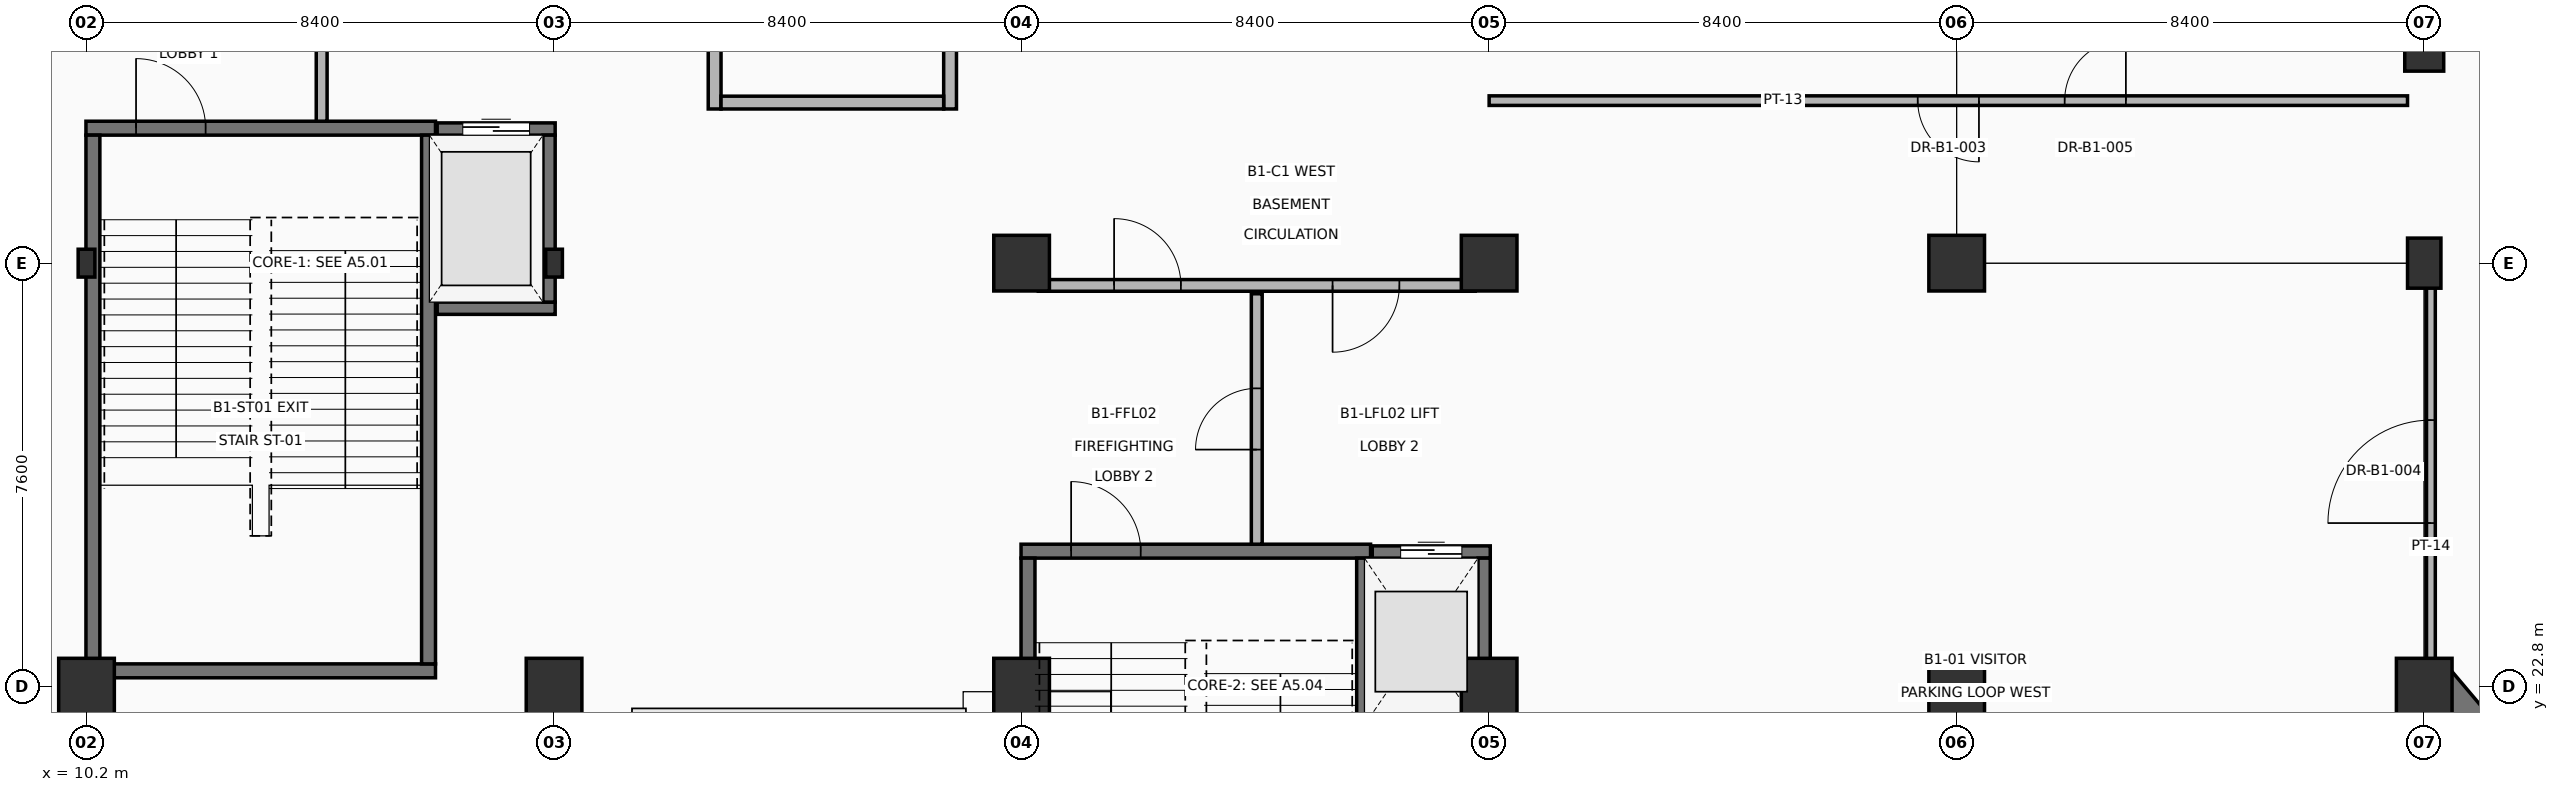
"""IFC4 building model, lengths in metres.
Left out: names, types, materials, properties, quantities, classifications, styles, units other than length and angle.
Written with IfcOpenShell. Run it as: python <this file> out.ifc"""

import sys

from ifc_helpers import new_model, si_unit, direction, frame, frame_2d, origin, origin_2d, place, context, subcontext, project, spatial, rectangle, hollow_rectangle, extrude, element, fill, save


model = new_model("IFC4")
c1 = context("Model", 3, precision=1e-05, world=origin(), true_north=direction((0.0, 1.0)))
c2 = subcontext(c1, "Body", "Model", "MODEL_VIEW")
j1 = project(units=[si_unit("LENGTHUNIT", "METRE"), si_unit("PLANEANGLEUNIT", "RADIAN")], contexts=[c1])
p1 = place(None, origin())
s1 = spatial("IfcSite", under=j1, at=p1, CompositionType="ELEMENT")
p2 = place(p1, origin())
s2 = spatial("IfcBuilding", under=s1, at=p2, CompositionType="ELEMENT")
p3 = place(p2, frame((0.0, 0.0, -5.4)))
s3 = spatial("IfcBuildingStorey", under=s2, at=p3, CompositionType="ELEMENT", Elevation=-5.4)
p4 = place(p3, frame((10.2, 22.8, 0.0), z_axis=(0.0, 0.0, 1.0), x_axis=(1.0, 0.0, 0.0)))
e1 = element("IfcColumn", 1, at=p4, inside=s3, PredefinedType="COLUMN", context=c2, shape_type="SweptSolid", body=[
    extrude(rectangle(XDim=1.0, YDim=1.0, at=origin_2d()), origin(), (0.0, 0.0, 1.0), 5.4),
])
p5 = place(p3, frame((10.2, 30.4, 0.0), z_axis=(0.0, 0.0, 1.0), x_axis=(1.0, 0.0, 0.0)))
e2 = element("IfcColumn", 2, at=p5, inside=s3, PredefinedType="COLUMN", context=c2, shape_type="SweptSolid", body=[
    extrude(hollow_rectangle(XDim=0.3, YDim=0.5, WallThickness=0.016, at=origin_2d()), origin(), (0.0, 0.0, 1.0), 5.4),
])
p6 = place(p3, frame((18.6, 22.8, 0.0), z_axis=(0.0, 0.0, 1.0), x_axis=(1.0, 0.0, 0.0)))
e3 = element("IfcColumn", 3, at=p6, inside=s3, PredefinedType="COLUMN", context=c2, shape_type="SweptSolid", body=[
    extrude(rectangle(XDim=1.0, YDim=1.0, at=origin_2d()), origin(), (0.0, 0.0, 1.0), 5.4),
])
p7 = place(p3, frame((18.6, 30.4, 0.0), z_axis=(0.0, 0.0, 1.0), x_axis=(1.0, 0.0, 0.0)))
e4 = element("IfcColumn", 4, at=p7, inside=s3, PredefinedType="COLUMN", context=c2, shape_type="SweptSolid", body=[
    extrude(hollow_rectangle(XDim=0.3, YDim=0.5, WallThickness=0.016, at=origin_2d()), origin(), (0.0, 0.0, 1.0), 5.4),
])
for number, where, z_axis, x_axis in (
    (5, (27.0, 22.8, 0.0), (0.0, 0.0, 1.0), (1.0, 0.0, 0.0)),
    (6, (27.0, 30.4, 0.0), (0.0, 0.0, 1.0), (1.0, 0.0, 0.0)),
    (7, (35.4, 22.8, 0.0), (0.0, 0.0, 1.0), (1.0, 0.0, 0.0)),
    (8, (35.4, 30.4, 0.0), (0.0, 0.0, 1.0), (1.0, 0.0, 0.0)),
):
    element("IfcColumn", number, at=place(p3, frame(where, z_axis=z_axis, x_axis=x_axis)), inside=s3, PredefinedType="COLUMN", context=c2, shape_type="SweptSolid", body=[
        extrude(rectangle(XDim=1.0, YDim=1.0, at=origin_2d()), origin(), (0.0, 0.0, 1.0), 5.4),
    ])
p8 = place(p3, frame((43.8, 22.8, 0.0), z_axis=(0.0, 0.0, 1.0), x_axis=(1.0, 0.0, 0.0)))
e9 = element("IfcColumn", 9, at=p8, inside=s3, PredefinedType="COLUMN", context=c2, shape_type="SweptSolid", body=[
    extrude(rectangle(XDim=1.0, YDim=1.0, at=origin_2d()), origin(), (0.0, 0.0, 1.0), 5.12),
])
for number, where, z_axis, x_axis in (
    (10, (43.8, 30.4, 0.0), (0.0, 0.0, 1.0), (1.0, 0.0, 0.0)),
    (11, (52.2, 22.8, 0.0), (0.0, 0.0, 1.0), (1.0, 0.0, 0.0)),
):
    element("IfcColumn", number, at=place(p3, frame(where, z_axis=z_axis, x_axis=x_axis)), inside=s3, PredefinedType="COLUMN", context=c2, shape_type="SweptSolid", body=[
        extrude(rectangle(XDim=1.0, YDim=1.0, at=origin_2d()), origin(), (0.0, 0.0, 1.0), 5.4),
    ])
p9 = place(p3, frame((52.2, 30.4, 0.0), z_axis=(0.0, 0.0, 1.0), x_axis=(1.0, 0.0, 0.0)))
e12 = element("IfcColumn", 12, at=p9, inside=s3, PredefinedType="COLUMN", context=c2, shape_type="SweptSolid", body=[
    extrude(rectangle(XDim=0.6, YDim=0.9, at=origin_2d()), origin(), (0.0, 0.0, 1.0), 5.4),
])
p10 = place(p3, frame((52.2, 34.2, 0.0), z_axis=(0.0, 0.0, 1.0), x_axis=(1.0, 0.0, 0.0)))
e13 = element("IfcColumn", 13, at=p10, inside=s3, PredefinedType="COLUMN", context=c2, shape_type="SweptSolid", body=[
    extrude(rectangle(XDim=0.7, YDim=0.7, at=origin_2d()), origin(), (0.0, 0.0, 1.0), 5.4),
])
p11 = place(p3, frame((57.06, 17.478, 0.0), z_axis=(0.0, 0.0, 1.0), x_axis=(-0.645642843129, 0.76363952171, 0.0)))
e14 = element("IfcWall", 14, at=p11, inside=s3, PredefinedType="USERDEFINED", context=c2, shape_type="SweptSolid", body=[
    extrude(rectangle(XDim=7.202, YDim=0.55, at=frame_2d((3.601, 0.0))), origin(), (0.0, 0.0, 1.0), 5.16),
])
p12 = place(p3, frame((10.19, 23.075, 0.0), z_axis=(0.0, 0.0, 1.0), x_axis=(1.0, 0.0, 0.0)))
e15 = element("IfcWall", 15, at=p12, inside=s3, PredefinedType="SHEAR", context=c2, shape_type="SweptSolid", body=[
    extrude(rectangle(XDim=6.28, YDim=0.25, at=frame_2d((3.14, 0.0))), origin(), (0.0, 0.0, 1.0), 5.12),
])
p13 = place(p3, frame((10.19, 32.825, 0.0), z_axis=(0.0, 0.0, 1.0), x_axis=(1.0, 0.0, 0.0)))
e16 = element("IfcWall", 16, at=p13, inside=s3, PredefinedType="SHEAR", context=c2, shape_type="SweptSolid", body=[
    extrude(rectangle(XDim=6.28, YDim=0.25, at=frame_2d((3.14, 0.0))), origin(), (0.0, 0.0, 1.0), 5.12),
])
p14 = place(p13, frame((0.9, 0.0, 0.0)))
e17 = element("IfcOpeningElement", 17, at=p14, cuts=e16, PredefinedType="OPENING", context=c2, shape_type="SweptSolid", body=[
    extrude(rectangle(XDim=1.25, YDim=2.2, at=frame_2d((0.625, 1.1))), frame((0.0, 0.135, 0.0), z_axis=(0.0, -1.0, 0.0), x_axis=(1.0, 0.0, 0.0)), (0.0, 0.0, 1.0), 0.27),
])
for number, where, z_axis, x_axis in (
    (18, (10.315, 23.2, 0.0), (0.0, 0.0, 1.0), (0.0, 1.0, 0.0)),
    (19, (16.345, 23.2, 0.0), (0.0, 0.0, 1.0), (0.0, 1.0, 0.0)),
):
    element("IfcWall", number, at=place(p3, frame(where, z_axis=z_axis, x_axis=x_axis)), inside=s3, PredefinedType="SHEAR", context=c2, shape_type="SweptSolid", body=[
        extrude(rectangle(XDim=9.5, YDim=0.25, at=frame_2d((4.75, 0.0))), origin(), (0.0, 0.0, 1.0), 5.12),
    ])
p15 = place(p3, frame((16.5, 29.59, 0.0), z_axis=(0.0, 0.0, 1.0), x_axis=(1.0, 0.0, 0.0)))
e20 = element("IfcWall", 20, at=p15, inside=s3, PredefinedType="SHEAR", context=c2, shape_type="SweptSolid", body=[
    extrude(rectangle(XDim=2.12, YDim=0.22, at=frame_2d((1.06, 0.0))), origin(), (0.0, 0.0, 1.0), 5.12),
])
p16 = place(p3, frame((16.5, 32.81, 0.0), z_axis=(0.0, 0.0, 1.0), x_axis=(1.0, 0.0, 0.0)))
e21 = element("IfcWall", 21, at=p16, inside=s3, PredefinedType="SHEAR", context=c2, shape_type="SweptSolid", body=[
    extrude(rectangle(XDim=2.12, YDim=0.22, at=frame_2d((1.06, 0.0))), origin(), (0.0, 0.0, 1.0), 5.12),
])
p17 = place(p16, frame((0.46, 0.0, 0.0)))
e22 = element("IfcOpeningElement", 22, at=p17, cuts=e21, PredefinedType="OPENING", context=c2, shape_type="SweptSolid", body=[
    extrude(rectangle(XDim=1.2, YDim=2.2, at=frame_2d((0.6, 1.1))), frame((0.0, 0.12, 0.0), z_axis=(0.0, -1.0, 0.0), x_axis=(1.0, 0.0, 0.0)), (0.0, 0.0, 1.0), 0.24),
])
p18 = place(p3, frame((18.51, 29.7, 0.0), z_axis=(0.0, 0.0, 1.0), x_axis=(0.0, 1.0, 0.0)))
e23 = element("IfcWall", 23, at=p18, inside=s3, PredefinedType="SHEAR", context=c2, shape_type="SweptSolid", body=[
    extrude(rectangle(XDim=3.0, YDim=0.22, at=frame_2d((1.5, 0.0))), origin(), (0.0, 0.0, 1.0), 5.12),
])
p19 = place(p3, frame((14.425, 32.95, 0.0), z_axis=(0.0, 0.0, 1.0), x_axis=(0.0, 1.0, 0.0)))
e24 = element("IfcWall", 24, at=p19, inside=s3, PredefinedType="PARTITIONING", context=c2, shape_type="SweptSolid", body=[
    extrude(rectangle(XDim=4.5, YDim=0.195, at=frame_2d((2.25, 0.0))), origin(), (0.0, 0.0, 1.0), 5.12),
])
p20 = place(p19, frame((1.7, 0.0, 0.0)))
e25 = element("IfcOpeningElement", 25, at=p20, cuts=e24, PredefinedType="OPENING", context=c2, shape_type="SweptSolid", body=[
    extrude(rectangle(XDim=1.1, YDim=2.15, at=frame_2d((0.55, 1.075))), frame((0.0, 0.107, 0.0), z_axis=(0.0, -1.0, 0.0), x_axis=(1.0, 0.0, 0.0)), (0.0, 0.0, 1.0), 0.215),
])
p21 = place(p3, frame((26.99, 25.225, 0.0), z_axis=(0.0, 0.0, 1.0), x_axis=(1.0, 0.0, 0.0)))
e26 = element("IfcWall", 26, at=p21, inside=s3, PredefinedType="SHEAR", context=c2, shape_type="SweptSolid", body=[
    extrude(rectangle(XDim=6.28, YDim=0.25, at=frame_2d((3.14, 0.0))), origin(), (0.0, 0.0, 1.0), 5.12),
])
p22 = place(p21, frame((0.9, 0.0, 0.0)))
e27 = element("IfcOpeningElement", 27, at=p22, cuts=e26, PredefinedType="OPENING", context=c2, shape_type="SweptSolid", body=[
    extrude(rectangle(XDim=1.25, YDim=2.2, at=frame_2d((0.625, 1.1))), frame((0.0, 0.135, 0.0), z_axis=(0.0, -1.0, 0.0), x_axis=(1.0, 0.0, 0.0)), (0.0, 0.0, 1.0), 0.27),
])
for number, where, z_axis, x_axis in (
    (28, (27.115, 15.6, 0.0), (0.0, 0.0, 1.0), (0.0, 1.0, 0.0)),
    (29, (33.145, 15.6, 0.0), (0.0, 0.0, 1.0), (0.0, 1.0, 0.0)),
):
    element("IfcWall", number, at=place(p3, frame(where, z_axis=z_axis, x_axis=x_axis)), inside=s3, PredefinedType="SHEAR", context=c2, shape_type="SweptSolid", body=[
        extrude(rectangle(XDim=9.5, YDim=0.25, at=frame_2d((4.75, 0.0))), origin(), (0.0, 0.0, 1.0), 5.12),
    ])
p23 = place(p3, frame((33.3, 25.21, 0.0), z_axis=(0.0, 0.0, 1.0), x_axis=(1.0, 0.0, 0.0)))
e30 = element("IfcWall", 30, at=p23, inside=s3, PredefinedType="SHEAR", context=c2, shape_type="SweptSolid", body=[
    extrude(rectangle(XDim=2.12, YDim=0.22, at=frame_2d((1.06, 0.0))), origin(), (0.0, 0.0, 1.0), 5.12),
])
p24 = place(p23, frame((0.51, 0.0, 0.0)))
e31 = element("IfcOpeningElement", 31, at=p24, cuts=e30, PredefinedType="OPENING", context=c2, shape_type="SweptSolid", body=[
    extrude(rectangle(XDim=1.1, YDim=2.15, at=frame_2d((0.55, 1.075))), frame((0.0, 0.12, 0.0), z_axis=(0.0, -1.0, 0.0), x_axis=(1.0, 0.0, 0.0)), (0.0, 0.0, 1.0), 0.24),
])
p25 = place(p3, frame((35.31, 22.1, 0.0), z_axis=(0.0, 0.0, 1.0), x_axis=(0.0, 1.0, 0.0)))
e32 = element("IfcWall", 32, at=p25, inside=s3, PredefinedType="SHEAR", context=c2, shape_type="SweptSolid", body=[
    extrude(rectangle(XDim=3.0, YDim=0.22, at=frame_2d((1.5, 0.0))), origin(), (0.0, 0.0, 1.0), 5.12),
])
p26 = place(p3, frame((27.3, 30.0, 0.0), z_axis=(0.0, 0.0, 1.0), x_axis=(1.0, 0.0, 0.0)))
e33 = element("IfcWall", 33, at=p26, inside=s3, PredefinedType="PARTITIONING", context=c2, shape_type="SweptSolid", body=[
    extrude(rectangle(XDim=7.85, YDim=0.21, at=frame_2d((3.925, 0.0))), origin(), (0.0, 0.0, 1.0), 5.12),
])
p27 = place(p26, frame((1.362, 0.0, 0.0)))
e34 = element("IfcOpeningElement", 34, at=p27, cuts=e33, PredefinedType="OPENING", context=c2, shape_type="SweptSolid", body=[
    extrude(rectangle(XDim=1.2, YDim=2.2, at=frame_2d((0.6, 1.1))), frame((0.0, 0.115, 0.0), z_axis=(0.0, -1.0, 0.0), x_axis=(1.0, 0.0, 0.0)), (0.0, 0.0, 1.0), 0.23),
])
p28 = place(p26, frame((5.287, 0.0, 0.0)))
e35 = element("IfcOpeningElement", 35, at=p28, cuts=e33, PredefinedType="OPENING", context=c2, shape_type="SweptSolid", body=[
    extrude(rectangle(XDim=1.2, YDim=2.2, at=frame_2d((0.6, 1.1))), frame((0.0, 0.115, 0.0), z_axis=(0.0, -1.0, 0.0), x_axis=(1.0, 0.0, 0.0)), (0.0, 0.0, 1.0), 0.23),
])
p29 = place(p3, frame((31.225, 25.35, 0.0), z_axis=(0.0, 0.0, 1.0), x_axis=(0.0, 1.0, 0.0)))
e36 = element("IfcWall", 36, at=p29, inside=s3, PredefinedType="PARTITIONING", context=c2, shape_type="SweptSolid", body=[
    extrude(rectangle(XDim=4.5, YDim=0.195, at=frame_2d((2.25, 0.0))), origin(), (0.0, 0.0, 1.0), 5.12),
])
p30 = place(p29, frame((1.7, 0.0, 0.0)))
e37 = element("IfcOpeningElement", 37, at=p30, cuts=e36, PredefinedType="OPENING", context=c2, shape_type="SweptSolid", body=[
    extrude(rectangle(XDim=1.1, YDim=2.15, at=frame_2d((0.55, 1.075))), frame((0.0, 0.107, 0.0), z_axis=(0.0, -1.0, 0.0), x_axis=(1.0, 0.0, 0.0)), (0.0, 0.0, 1.0), 0.215),
])
p31 = place(p3, frame((21.485, 33.17, 0.0), z_axis=(0.0, 0.0, 1.0), x_axis=(0.0, 1.0, 0.0)))
e38 = element("IfcWall", 38, at=p31, inside=s3, PredefinedType="PLUMBINGWALL", context=c2, shape_type="SweptSolid", body=[
    extrude(rectangle(XDim=4.46, YDim=0.23, at=frame_2d((2.23, 0.0))), origin(), (0.0, 0.0, 1.0), 5.12),
])
p32 = place(p31, frame((1.755, 0.0, 0.0)))
e39 = element("IfcOpeningElement", 39, at=p32, cuts=e38, PredefinedType="OPENING", context=c2, shape_type="SweptSolid", body=[
    extrude(rectangle(XDim=0.95, YDim=2.1, at=frame_2d((0.475, 1.05))), frame((0.0, 0.125, 0.0), z_axis=(0.0, -1.0, 0.0), x_axis=(1.0, 0.0, 0.0)), (0.0, 0.0, 1.0), 0.25),
])
p33 = place(p3, frame((25.715, 33.17, 0.0), z_axis=(0.0, 0.0, 1.0), x_axis=(0.0, 1.0, 0.0)))
e40 = element("IfcWall", 40, at=p33, inside=s3, PredefinedType="PLUMBINGWALL", context=c2, shape_type="SweptSolid", body=[
    extrude(rectangle(XDim=4.46, YDim=0.23, at=frame_2d((2.23, 0.0))), origin(), (0.0, 0.0, 1.0), 5.12),
])
p34 = place(p3, frame((21.6, 33.285, 0.0), z_axis=(0.0, 0.0, 1.0), x_axis=(1.0, 0.0, 0.0)))
e41 = element("IfcWall", 41, at=p34, inside=s3, PredefinedType="PLUMBINGWALL", context=c2, shape_type="SweptSolid", body=[
    extrude(rectangle(XDim=4.0, YDim=0.23, at=frame_2d((2.0, 0.0))), origin(), (0.0, 0.0, 1.0), 4.761),
])
p35 = place(p3, frame((51.9, 33.32, 0.0), z_axis=(0.0, 0.0, 1.0), x_axis=(-1.0, 0.0, 0.0)))
e42 = element("IfcWall", 42, at=p35, inside=s3, PredefinedType="PARTITIONING", context=c2, shape_type="SweptSolid", body=[
    extrude(rectangle(XDim=16.5, YDim=0.172, at=frame_2d((8.25, 0.0))), origin(), (0.0, 0.0, 1.0), 4.345),
])
p36 = place(p35, frame((7.7, 0.0, 0.0)))
e43 = element("IfcOpeningElement", 43, at=p36, cuts=e42, PredefinedType="OPENING", context=c2, shape_type="SweptSolid", body=[
    extrude(rectangle(XDim=1.1, YDim=2.15, at=frame_2d((0.55, 1.075))), frame((0.0, 0.096, 0.0), z_axis=(0.0, -1.0, 0.0), x_axis=(1.0, 0.0, 0.0)), (0.0, 0.0, 1.0), 0.192),
])
p37 = place(p35, frame((5.06, 0.0, 0.0)))
e44 = element("IfcOpeningElement", 44, at=p37, cuts=e42, PredefinedType="OPENING", context=c2, shape_type="SweptSolid", body=[
    extrude(rectangle(XDim=1.1, YDim=2.15, at=frame_2d((0.55, 1.075))), frame((0.0, 0.096, 0.0), z_axis=(0.0, -1.0, 0.0), x_axis=(1.0, 0.0, 0.0)), (0.0, 0.0, 1.0), 0.192),
])
p38 = place(p3, frame((52.32, 22.91, 0.0), z_axis=(0.0, 0.0, 1.0), x_axis=(0.0, 1.0, 0.0)))
e45 = element("IfcWall", 45, at=p38, inside=s3, PredefinedType="PARTITIONING", context=c2, shape_type="SweptSolid", body=[
    extrude(rectangle(XDim=7.49, YDim=0.158, at=frame_2d((3.745, 0.0))), origin(), (0.0, 0.0, 1.0), 4.345),
])
p39 = place(p38, frame((2.82, 0.0, 0.0)))
e46 = element("IfcOpeningElement", 46, at=p39, cuts=e45, PredefinedType="OPENING", context=c2, shape_type="SweptSolid", body=[
    extrude(rectangle(XDim=1.85, YDim=2.3, at=frame_2d((0.925, 1.15))), frame((0.0, 0.089, 0.0), z_axis=(0.0, -1.0, 0.0), x_axis=(1.0, 0.0, 0.0)), (0.0, 0.0, 1.0), 0.178),
])
p40 = place(p14, origin())
e47 = element("IfcDoor", 47, at=p40, inside=s3, OperationType="SINGLE_SWING_LEFT", PredefinedType="DOOR", context=c2, shape_type="SweptSolid", body=[
    extrude(rectangle(XDim=1.25, YDim=2.2, at=frame_2d((0.625, 1.1))), frame((0.0, 0.025, 0.0), z_axis=(0.0, -1.0, 0.0), x_axis=(1.0, 0.0, 0.0)), (0.0, 0.0, 1.0), 0.05),
])
fill(e17, e47)
p41 = place(p17, origin())
e48 = element("IfcDoor", 48, at=p41, inside=s3, OperationType="DOUBLE_DOOR_SLIDING", PredefinedType="DOOR", context=c2, shape_type="SweptSolid", body=[
    extrude(rectangle(XDim=1.2, YDim=2.2, at=frame_2d((0.6, 1.1))), frame((0.0, 0.025, 0.0), z_axis=(0.0, -1.0, 0.0), x_axis=(1.0, 0.0, 0.0)), (0.0, 0.0, 1.0), 0.05),
])
fill(e22, e48)
p42 = place(p22, origin())
e49 = element("IfcDoor", 49, at=p42, inside=s3, OperationType="SINGLE_SWING_LEFT", PredefinedType="DOOR", context=c2, shape_type="SweptSolid", body=[
    extrude(rectangle(XDim=1.25, YDim=2.2, at=frame_2d((0.625, 1.1))), frame((0.0, 0.025, 0.0), z_axis=(0.0, -1.0, 0.0), x_axis=(1.0, 0.0, 0.0)), (0.0, 0.0, 1.0), 0.05),
])
fill(e27, e49)
p43 = place(p24, origin())
e50 = element("IfcDoor", 50, at=p43, inside=s3, OperationType="DOUBLE_DOOR_SLIDING", PredefinedType="DOOR", context=c2, shape_type="SweptSolid", body=[
    extrude(rectangle(XDim=1.1, YDim=2.15, at=frame_2d((0.55, 1.075))), frame((0.0, 0.025, 0.0), z_axis=(0.0, -1.0, 0.0), x_axis=(1.0, 0.0, 0.0)), (0.0, 0.0, 1.0), 0.05),
])
fill(e31, e50)
p44 = place(p27, origin())
e51 = element("IfcDoor", 51, at=p44, inside=s3, OperationType="SINGLE_SWING_LEFT", PredefinedType="DOOR", context=c2, shape_type="SweptSolid", body=[
    extrude(rectangle(XDim=1.2, YDim=2.2, at=frame_2d((0.6, 1.1))), frame((0.0, 0.025, 0.0), z_axis=(0.0, -1.0, 0.0), x_axis=(1.0, 0.0, 0.0)), (0.0, 0.0, 1.0), 0.05),
])
fill(e34, e51)
p45 = place(p28, origin())
e52 = element("IfcDoor", 52, at=p45, inside=s3, OperationType="SINGLE_SWING_RIGHT", PredefinedType="DOOR", context=c2, shape_type="SweptSolid", body=[
    extrude(rectangle(XDim=1.2, YDim=2.2, at=frame_2d((0.6, 1.1))), frame((0.0, 0.025, 0.0), z_axis=(0.0, -1.0, 0.0), x_axis=(1.0, 0.0, 0.0)), (0.0, 0.0, 1.0), 0.05),
])
fill(e35, e52)
p46 = place(p30, origin())
e53 = element("IfcDoor", 53, at=p46, inside=s3, OperationType="SINGLE_SWING_LEFT", PredefinedType="DOOR", context=c2, shape_type="SweptSolid", body=[
    extrude(rectangle(XDim=1.1, YDim=2.15, at=frame_2d((0.55, 1.075))), frame((0.0, 0.025, 0.0), z_axis=(0.0, -1.0, 0.0), x_axis=(1.0, 0.0, 0.0)), (0.0, 0.0, 1.0), 0.05),
])
fill(e37, e53)
p47 = place(p36, origin())
e54 = element("IfcDoor", 54, at=p47, inside=s3, OperationType="SINGLE_SWING_LEFT", PredefinedType="DOOR", context=c2, shape_type="SweptSolid", body=[
    extrude(rectangle(XDim=1.1, YDim=2.15, at=frame_2d((0.55, 1.075))), frame((0.0, 0.025, 0.0), z_axis=(0.0, -1.0, 0.0), x_axis=(1.0, 0.0, 0.0)), (0.0, 0.0, 1.0), 0.05),
])
fill(e43, e54)
p48 = place(p39, origin())
e55 = element("IfcDoor", 55, at=p48, inside=s3, OperationType="DOUBLE_DOOR_SINGLE_SWING", PredefinedType="DOOR", context=c2, shape_type="SweptSolid", body=[
    extrude(rectangle(XDim=1.85, YDim=2.3, at=frame_2d((0.925, 1.15))), frame((0.0, 0.025, 0.0), z_axis=(0.0, -1.0, 0.0), x_axis=(1.0, 0.0, 0.0)), (0.0, 0.0, 1.0), 0.05),
])
fill(e46, e55)
p49 = place(p37, origin())
e56 = element("IfcDoor", 56, at=p49, inside=s3, OperationType="SINGLE_SWING_RIGHT", PredefinedType="DOOR", context=c2, shape_type="SweptSolid", body=[
    extrude(rectangle(XDim=1.1, YDim=2.15, at=frame_2d((0.55, 1.075))), frame((0.0, 0.025, 0.0), z_axis=(0.0, -1.0, 0.0), x_axis=(1.0, 0.0, 0.0)), (0.0, 0.0, 1.0), 0.05),
])
fill(e44, e56)
save(model, sys.argv[1])
